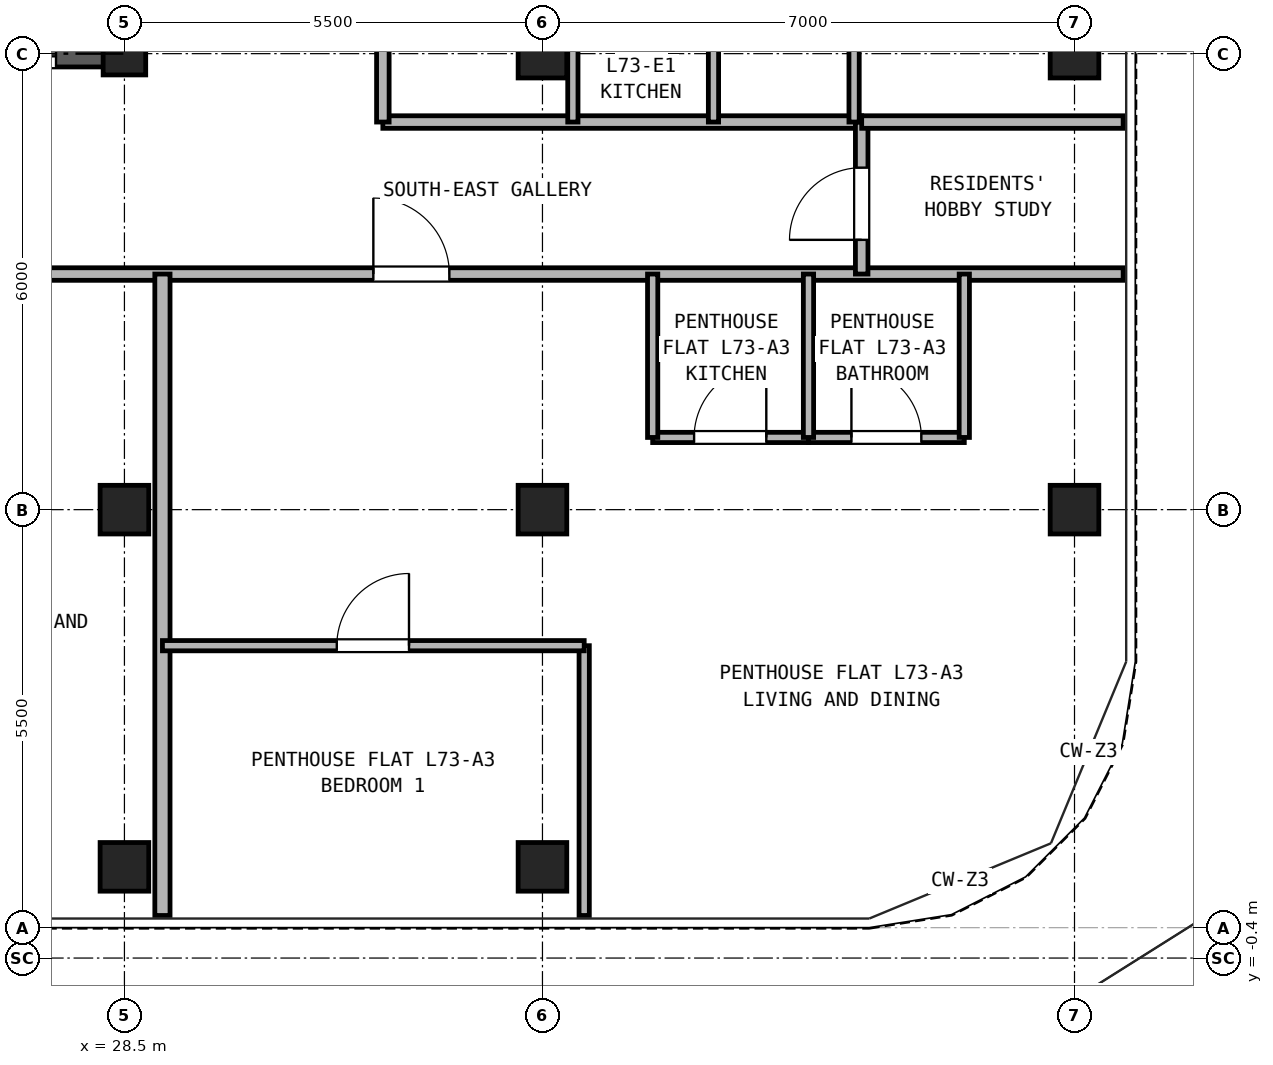
"""IFC4 building model, lengths in metres.
Left out: names, types, materials, properties, quantities, classifications, styles, units other than length and angle.
Written with IfcOpenShell. Run it as: python <this file> out.ifc"""

import sys

from ifc_helpers import new_model, si_unit, direction, frame, frame_2d, origin, origin_2d, place, context, subcontext, project, spatial, rectangle, hollow_rectangle, extrude, source, transform, mapped, element, fill, save


model = new_model("IFC4")
c1 = context("Model", 3, precision=1e-05, world=origin(), true_north=direction((0.0, 1.0)))
c2 = subcontext(c1, "Body", "Model", "MODEL_VIEW")
j1 = project(units=[si_unit("LENGTHUNIT", "METRE"), si_unit("PLANEANGLEUNIT", "RADIAN")], contexts=[c1])
p1 = place(None, origin())
s1 = spatial("IfcSite", under=j1, at=p1, CompositionType="ELEMENT")
p2 = place(p1, origin())
s2 = spatial("IfcBuilding", under=s1, at=p2, CompositionType="ELEMENT")
p3 = place(p2, frame((0.0, 0.0, 255.3)))
s3 = spatial("IfcBuildingStorey", under=s2, at=p3, CompositionType="ELEMENT", Elevation=255.3)
m1 = source(origin(), c2, "Body", "SweptSolid", [
    extrude(hollow_rectangle(XDim=0.64, YDim=0.64, WallThickness=0.035, at=origin_2d()), origin(), (0.0, 0.0, 1.0), 2.98),
])
for number, where, z_axis, x_axis in (
    (1, (28.5, 0.8, 0.0), (0.0, 0.0, 1.0), (1.0, 0.0, 0.0)),
    (2, (34.0, 0.8, 0.0), (0.0, 0.0, 1.0), (1.0, 0.0, 0.0)),
    (3, (41.0, 5.5, 0.0), (0.0, 0.0, 1.0), (1.0, 0.0, 0.0)),
    (4, (41.0, 11.5, 0.0), (0.0, 0.0, 1.0), (1.0, 0.0, 0.0)),
    (5, (28.5, 5.5, 0.0), (0.0, 0.0, 1.0), (1.0, 0.0, 0.0)),
):
    element("IfcColumn", number, at=place(p3, frame(where, z_axis=z_axis, x_axis=x_axis)), inside=s3, PredefinedType="COLUMN", context=c2, shape_type="MappedRepresentation", body=[
        mapped(m1, transform((0.0, 0.0, 0.0), x_axis=(1.0, 0.0, 0.0), y_axis=(0.0, 1.0, 0.0), z_axis=(0.0, 0.0, 1.0), scale=1.0)),
    ])
m2 = source(origin(), c2, "Body", "SweptSolid", [
    extrude(hollow_rectangle(XDim=0.56, YDim=0.56, WallThickness=0.03, at=origin_2d()), origin(), (0.0, 0.0, 1.0), 2.98),
])
p4 = place(p3, frame((28.5, 11.5, 0.0), z_axis=(0.0, 0.0, 1.0), x_axis=(1.0, 0.0, 0.0)))
e6 = element("IfcColumn", 6, at=p4, inside=s3, PredefinedType="COLUMN", context=c2, shape_type="MappedRepresentation", body=[
    mapped(m2, transform((0.0, 0.0, 0.0), x_axis=(1.0, 0.0, 0.0), y_axis=(0.0, 1.0, 0.0), z_axis=(0.0, 0.0, 1.0), scale=1.0)),
])
for number, where, z_axis, x_axis in (
    (7, (34.0, 5.5, 0.0), (0.0, 0.0, 1.0), (1.0, 0.0, 0.0)),
    (8, (34.0, 11.5, 0.0), (0.0, 0.0, 1.0), (1.0, 0.0, 0.0)),
):
    element("IfcColumn", number, at=place(p3, frame(where, z_axis=z_axis, x_axis=x_axis)), inside=s3, PredefinedType="COLUMN", context=c2, shape_type="MappedRepresentation", body=[
        mapped(m1, transform((0.0, 0.0, 0.0), x_axis=(1.0, 0.0, 0.0), y_axis=(0.0, 1.0, 0.0), z_axis=(0.0, 0.0, 1.0), scale=1.0)),
    ])
p5 = place(p3, frame((18.325, 11.5, 0.0), z_axis=(0.0, 0.0, 1.0), x_axis=(1.0, 0.0, 0.0)))
e9 = element("IfcWall", 9, at=p5, inside=s3, PredefinedType="SHEAR", context=c2, shape_type="SweptSolid", body=[
    extrude(rectangle(XDim=10.35, YDim=0.35, at=frame_2d((5.175, 0.0))), origin(), (0.0, 0.0, 1.0), 2.98),
])
p6 = place(p5, frame((1.775, 0.0, 0.0)))
e10 = element("IfcOpeningElement", 10, at=p6, cuts=e9, PredefinedType="OPENING", context=c2, shape_type="SweptSolid", body=[
    extrude(rectangle(XDim=0.95, YDim=2.15, at=frame_2d((0.475, 1.075))), frame((0.0, 0.185, 0.0), z_axis=(0.0, -1.0, 0.0), x_axis=(1.0, 0.0, 0.0)), (0.0, 0.0, 1.0), 0.37),
])
p7 = place(p5, frame((5.275, 0.0, 0.0)))
e11 = element("IfcOpeningElement", 11, at=p7, cuts=e9, PredefinedType="OPENING", context=c2, shape_type="SweptSolid", body=[
    extrude(rectangle(XDim=0.95, YDim=2.15, at=frame_2d((0.475, 1.075))), frame((0.0, 0.185, 0.0), z_axis=(0.0, -1.0, 0.0), x_axis=(1.0, 0.0, 0.0)), (0.0, 0.0, 1.0), 0.37),
])
p8 = place(p5, frame((8.175, 0.0, 0.0)))
e12 = element("IfcOpeningElement", 12, at=p8, cuts=e9, PredefinedType="OPENING", context=c2, shape_type="SweptSolid", body=[
    extrude(rectangle(XDim=1.1, YDim=2.25, at=frame_2d((0.55, 1.125))), frame((0.0, 0.185, 0.0), z_axis=(0.0, -1.0, 0.0), x_axis=(1.0, 0.0, 0.0)), (0.0, 0.0, 1.0), 0.37),
])
p9 = place(p3, frame((5.36, 8.6, 0.0), z_axis=(0.0, 0.0, 1.0), x_axis=(1.0, 0.0, 0.0)))
e13 = element("IfcWall", 13, at=p9, inside=s3, PredefinedType="PARTITIONING", context=c2, shape_type="SweptSolid", body=[
    extrude(rectangle(XDim=36.28, YDim=0.165, at=frame_2d((18.14, 0.0))), origin(), (0.0, 0.0, 1.0), 2.655),
])
p10 = place(p9, frame((8.365, 0.0, 0.0)))
e14 = element("IfcOpeningElement", 14, at=p10, cuts=e13, PredefinedType="OPENING", context=c2, shape_type="SweptSolid", body=[
    extrude(rectangle(XDim=1.0, YDim=2.15, at=frame_2d((0.5, 1.075))), frame((0.0, 0.093, 0.0), z_axis=(0.0, -1.0, 0.0), x_axis=(1.0, 0.0, 0.0)), (0.0, 0.0, 1.0), 0.185),
])
p11 = place(p9, frame((14.165, 0.0, 0.0)))
e15 = element("IfcOpeningElement", 15, at=p11, cuts=e13, PredefinedType="OPENING", context=c2, shape_type="SweptSolid", body=[
    extrude(rectangle(XDim=1.0, YDim=2.15, at=frame_2d((0.5, 1.075))), frame((0.0, 0.093, 0.0), z_axis=(0.0, -1.0, 0.0), x_axis=(1.0, 0.0, 0.0)), (0.0, 0.0, 1.0), 0.185),
])
p12 = place(p9, frame((26.415, 0.0, 0.0)))
e16 = element("IfcOpeningElement", 16, at=p12, cuts=e13, PredefinedType="OPENING", context=c2, shape_type="SweptSolid", body=[
    extrude(rectangle(XDim=1.0, YDim=2.15, at=frame_2d((0.5, 1.075))), frame((0.0, 0.093, 0.0), z_axis=(0.0, -1.0, 0.0), x_axis=(1.0, 0.0, 0.0)), (0.0, 0.0, 1.0), 0.185),
])
p13 = place(p3, frame((31.9, 10.6, 0.0), z_axis=(0.0, 0.0, 1.0), x_axis=(1.0, 0.0, 0.0)))
e17 = element("IfcWall", 17, at=p13, inside=s3, PredefinedType="PARTITIONING", context=c2, shape_type="SweptSolid", body=[
    extrude(rectangle(XDim=6.3, YDim=0.165, at=frame_2d((3.15, 0.0))), origin(), (0.0, 0.0, 1.0), 2.98),
])
p14 = place(p3, frame((38.2, 8.6, 0.0), z_axis=(0.0, 0.0, 1.0), x_axis=(0.0, 1.0, 0.0)))
e18 = element("IfcWall", 18, at=p14, inside=s3, PredefinedType="PARTITIONING", context=c2, shape_type="SweptSolid", body=[
    extrude(rectangle(XDim=2.0, YDim=0.165, at=frame_2d((1.0, 0.0))), origin(), (0.0, 0.0, 1.0), 2.98),
])
p15 = place(p14, frame((0.45, 0.0, 0.0)))
e19 = element("IfcOpeningElement", 19, at=p15, cuts=e18, PredefinedType="OPENING", context=c2, shape_type="SweptSolid", body=[
    extrude(rectangle(XDim=0.95, YDim=2.15, at=frame_2d((0.475, 1.075))), frame((0.0, 0.093, 0.0), z_axis=(0.0, -1.0, 0.0), x_axis=(1.0, 0.0, 0.0)), (0.0, 0.0, 1.0), 0.185),
])
p16 = place(p3, frame((31.9, 10.6, 0.0), z_axis=(0.0, 0.0, 1.0), x_axis=(0.0, 1.0, 0.0)))
e20 = element("IfcWall", 20, at=p16, inside=s3, PredefinedType="PARTITIONING", context=c2, shape_type="SweptSolid", body=[
    extrude(rectangle(XDim=24.54, YDim=0.165, at=frame_2d((12.27, 0.0))), origin(), (0.0, 0.0, 1.0), 2.98),
])
p17 = place(p16, frame((4.95, 0.0, 0.0)))
e21 = element("IfcOpeningElement", 21, at=p17, cuts=e20, PredefinedType="OPENING", context=c2, shape_type="SweptSolid", body=[
    extrude(rectangle(XDim=1.0, YDim=2.15, at=frame_2d((0.5, 1.075))), frame((0.0, 0.093, 0.0), z_axis=(0.0, -1.0, 0.0), x_axis=(1.0, 0.0, 0.0)), (0.0, 0.0, 1.0), 0.185),
])
p18 = place(p16, frame((15.65, 0.0, 0.0)))
e22 = element("IfcOpeningElement", 22, at=p18, cuts=e20, PredefinedType="OPENING", context=c2, shape_type="SweptSolid", body=[
    extrude(rectangle(XDim=1.0, YDim=2.15, at=frame_2d((0.5, 1.075))), frame((0.0, 0.093, 0.0), z_axis=(0.0, -1.0, 0.0), x_axis=(1.0, 0.0, 0.0)), (0.0, 0.0, 1.0), 0.185),
])
p19 = place(p3, frame((29.0, 0.16, 0.0), z_axis=(0.0, 0.0, 1.0), x_axis=(0.0, 1.0, 0.0)))
e23 = element("IfcWall", 23, at=p19, inside=s3, PredefinedType="PARTITIONING", context=c2, shape_type="SweptSolid", body=[
    extrude(rectangle(XDim=8.44, YDim=0.2, at=frame_2d((4.22, 0.0))), origin(), (0.0, 0.0, 1.0), 2.98),
])
p20 = place(p3, frame((35.45, 6.45, 0.0), z_axis=(0.0, 0.0, 1.0), x_axis=(1.0, 0.0, 0.0)))
e24 = element("IfcWall", 24, at=p20, inside=s3, PredefinedType="PARTITIONING", context=c2, shape_type="SweptSolid", body=[
    extrude(rectangle(XDim=2.05, YDim=0.135, at=frame_2d((1.025, 0.0))), origin(), (0.0, 0.0, 1.0), 2.98),
])
p21 = place(p20, frame((0.545, 0.0, 0.0)))
e25 = element("IfcOpeningElement", 25, at=p21, cuts=e24, PredefinedType="OPENING", context=c2, shape_type="SweptSolid", body=[
    extrude(rectangle(XDim=0.95, YDim=2.15, at=frame_2d((0.475, 1.075))), frame((0.0, 0.077, 0.0), z_axis=(0.0, -1.0, 0.0), x_axis=(1.0, 0.0, 0.0)), (0.0, 0.0, 1.0), 0.155),
])
p22 = place(p3, frame((37.5, 6.45, 0.0), z_axis=(0.0, 0.0, 1.0), x_axis=(1.0, 0.0, 0.0)))
e26 = element("IfcWall", 26, at=p22, inside=s3, PredefinedType="PARTITIONING", context=c2, shape_type="SweptSolid", body=[
    extrude(rectangle(XDim=2.05, YDim=0.135, at=frame_2d((1.025, 0.0))), origin(), (0.0, 0.0, 1.0), 2.98),
])
p23 = place(p22, frame((0.565, 0.0, 0.0)))
e27 = element("IfcOpeningElement", 27, at=p23, cuts=e26, PredefinedType="OPENING", context=c2, shape_type="SweptSolid", body=[
    extrude(rectangle(XDim=0.92, YDim=2.1, at=frame_2d((0.46, 1.05))), frame((0.0, 0.077, 0.0), z_axis=(0.0, -1.0, 0.0), x_axis=(1.0, 0.0, 0.0)), (0.0, 0.0, 1.0), 0.155),
])
for number, where, z_axis, x_axis in (
    (28, (35.45, 6.45, 0.0), (0.0, 0.0, 1.0), (0.0, 1.0, 0.0)),
    (29, (37.5, 6.45, 0.0), (0.0, 0.0, 1.0), (0.0, 1.0, 0.0)),
    (30, (39.55, 6.45, 0.0), (0.0, 0.0, 1.0), (0.0, 1.0, 0.0)),
):
    element("IfcWall", number, at=place(p3, frame(where, z_axis=z_axis, x_axis=x_axis)), inside=s3, PredefinedType="PARTITIONING", context=c2, shape_type="SweptSolid", body=[
        extrude(rectangle(XDim=2.15, YDim=0.135, at=frame_2d((1.075, 0.0))), origin(), (0.0, 0.0, 1.0), 2.98),
    ])
p24 = place(p3, frame((34.549, 0.16, 0.0), z_axis=(0.0, 0.0, 1.0), x_axis=(0.0, 1.0, 0.0)))
e31 = element("IfcWall", 31, at=p24, inside=s3, PredefinedType="PARTITIONING", context=c2, shape_type="SweptSolid", body=[
    extrude(rectangle(XDim=3.55, YDim=0.135, at=frame_2d((1.775, 0.0))), origin(), (0.0, 0.0, 1.0), 2.98),
])
p25 = place(p3, frame((29.0, 3.71, 0.0), z_axis=(0.0, 0.0, 1.0), x_axis=(1.0, 0.0, 0.0)))
e32 = element("IfcWall", 32, at=p25, inside=s3, PredefinedType="PARTITIONING", context=c2, shape_type="SweptSolid", body=[
    extrude(rectangle(XDim=5.549, YDim=0.135, at=frame_2d((2.774, 0.0))), origin(), (0.0, 0.0, 1.0), 2.98),
])
p26 = place(p25, frame((2.294, 0.0, 0.0)))
e33 = element("IfcOpeningElement", 33, at=p26, cuts=e32, PredefinedType="OPENING", context=c2, shape_type="SweptSolid", body=[
    extrude(rectangle(XDim=0.95, YDim=2.15, at=frame_2d((0.475, 1.075))), frame((0.0, 0.077, 0.0), z_axis=(0.0, -1.0, 0.0), x_axis=(1.0, 0.0, 0.0)), (0.0, 0.0, 1.0), 0.155),
])
p27 = place(p3, frame((38.2, 10.6, 0.0), z_axis=(0.0, 0.0, 1.0), x_axis=(1.0, 0.0, 0.0)))
e34 = element("IfcWall", 34, at=p27, inside=s3, PredefinedType="PARTITIONING", context=c2, shape_type="SweptSolid", body=[
    extrude(rectangle(XDim=3.44, YDim=0.165, at=frame_2d((1.72, 0.0))), origin(), (0.0, 0.0, 1.0), 2.98),
])
for number, where, z_axis, x_axis in (
    (35, (34.4, 10.6, 0.0), (0.0, 0.0, 1.0), (0.0, 1.0, 0.0)),
    (36, (36.25, 10.6, 0.0), (0.0, 0.0, 1.0), (0.0, 1.0, 0.0)),
    (37, (38.1, 10.6, 0.0), (0.0, 0.0, 1.0), (0.0, 1.0, 0.0)),
):
    element("IfcWall", number, at=place(p3, frame(where, z_axis=z_axis, x_axis=x_axis)), inside=s3, PredefinedType="PARTITIONING", context=c2, shape_type="SweptSolid", body=[
        extrude(rectangle(XDim=2.15, YDim=0.135, at=frame_2d((1.075, 0.0))), origin(), (0.0, 0.0, 1.0), 2.98),
    ])
p28 = place(p8, frame((1.1, 0.0, 0.0), z_axis=(0.0, 0.0, 1.0), x_axis=(-1.0, 0.0, 0.0)))
e38 = element("IfcDoor", 38, at=p28, inside=s3, OperationType="DOUBLE_DOOR_SLIDING", PredefinedType="DOOR", context=c2, shape_type="SweptSolid", body=[
    extrude(rectangle(XDim=1.1, YDim=2.25, at=frame_2d((0.55, 1.125))), frame((0.0, 0.025, 0.0), z_axis=(0.0, -1.0, 0.0), x_axis=(1.0, 0.0, 0.0)), (0.0, 0.0, 1.0), 0.05),
])
fill(e12, e38)
p29 = place(p21, origin())
e39 = element("IfcDoor", 39, at=p29, inside=s3, OperationType="SINGLE_SWING_RIGHT", PredefinedType="DOOR", context=c2, shape_type="SweptSolid", body=[
    extrude(rectangle(XDim=0.95, YDim=2.15, at=frame_2d((0.475, 1.075))), frame((0.0, 0.025, 0.0), z_axis=(0.0, -1.0, 0.0), x_axis=(1.0, 0.0, 0.0)), (0.0, 0.0, 1.0), 0.05),
])
fill(e25, e39)
p30 = place(p23, origin())
e40 = element("IfcDoor", 40, at=p30, inside=s3, OperationType="SINGLE_SWING_LEFT", PredefinedType="DOOR", context=c2, shape_type="SweptSolid", body=[
    extrude(rectangle(XDim=0.92, YDim=2.1, at=frame_2d((0.46, 1.05))), frame((0.0, 0.025, 0.0), z_axis=(0.0, -1.0, 0.0), x_axis=(1.0, 0.0, 0.0)), (0.0, 0.0, 1.0), 0.05),
])
fill(e27, e40)
p31 = place(p26, frame((0.95, 0.0, 0.0), z_axis=(0.0, 0.0, 1.0), x_axis=(-1.0, 0.0, 0.0)))
e41 = element("IfcDoor", 41, at=p31, inside=s3, OperationType="SINGLE_SWING_RIGHT", PredefinedType="DOOR", context=c2, shape_type="SweptSolid", body=[
    extrude(rectangle(XDim=0.95, YDim=2.15, at=frame_2d((0.475, 1.075))), frame((0.0, 0.025, 0.0), z_axis=(0.0, -1.0, 0.0), x_axis=(1.0, 0.0, 0.0)), (0.0, 0.0, 1.0), 0.05),
])
fill(e33, e41)
p32 = place(p12, frame((1.0, 0.0, 0.0), z_axis=(0.0, 0.0, 1.0), x_axis=(-1.0, 0.0, 0.0)))
e42 = element("IfcDoor", 42, at=p32, inside=s3, OperationType="SINGLE_SWING_LEFT", PredefinedType="DOOR", context=c2, shape_type="SweptSolid", body=[
    extrude(rectangle(XDim=1.0, YDim=2.15, at=frame_2d((0.5, 1.075))), frame((0.0, 0.025, 0.0), z_axis=(0.0, -1.0, 0.0), x_axis=(1.0, 0.0, 0.0)), (0.0, 0.0, 1.0), 0.05),
])
fill(e16, e42)
p33 = place(p15, origin())
e43 = element("IfcDoor", 43, at=p33, inside=s3, OperationType="SINGLE_SWING_LEFT", PredefinedType="DOOR", context=c2, shape_type="SweptSolid", body=[
    extrude(rectangle(XDim=0.95, YDim=2.15, at=frame_2d((0.475, 1.075))), frame((0.0, 0.025, 0.0), z_axis=(0.0, -1.0, 0.0), x_axis=(1.0, 0.0, 0.0)), (0.0, 0.0, 1.0), 0.05),
])
fill(e19, e43)
save(model, sys.argv[1])
